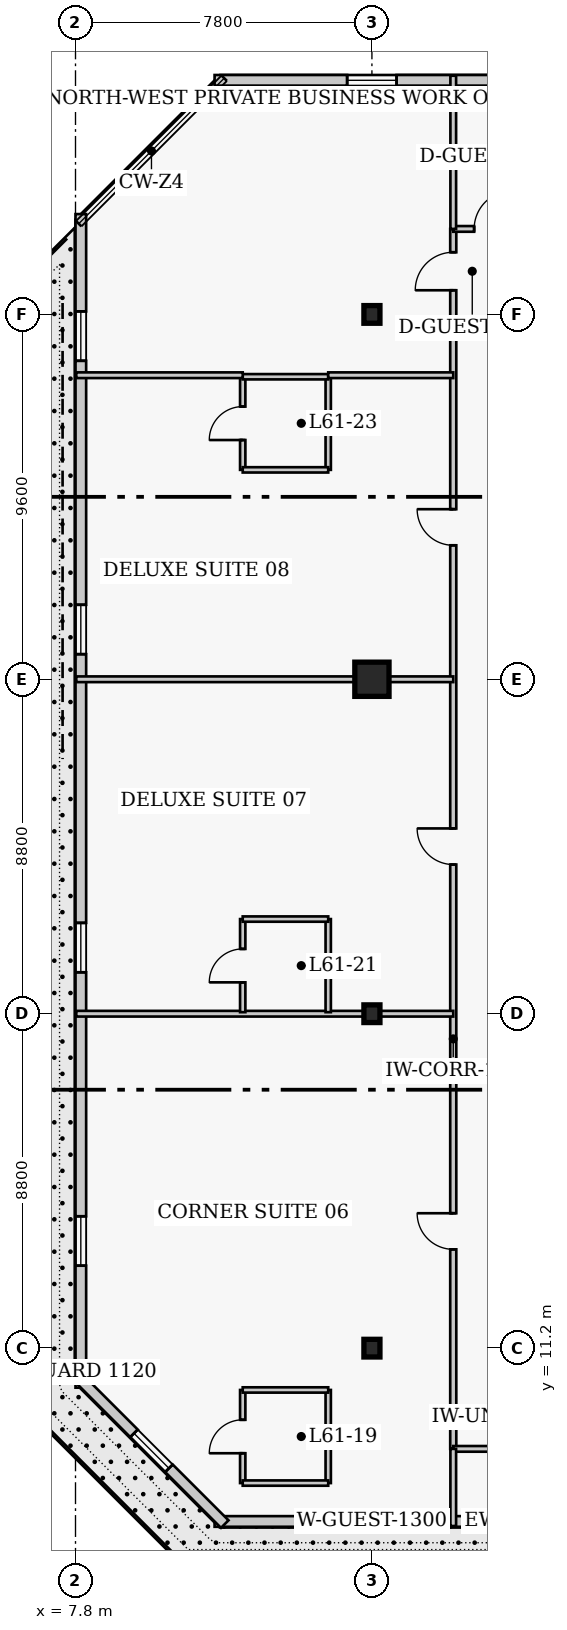
"""IFC4 building model, lengths in metres.
Left out: names, types, materials, properties, quantities, classifications, styles, units other than length and angle.
Written with IfcOpenShell. Run it as: python <this file> out.ifc"""

import sys

from ifc_helpers import new_model, si_unit, direction, frame, frame_2d, origin, origin_2d, place, context, subcontext, project, spatial, rectangle, i_section, extrude, element, fill, save


model = new_model("IFC4")
c1 = context("Model", 3, precision=1e-05, world=origin(), true_north=direction((0.0, 1.0)))
c2 = subcontext(c1, "Body", "Model", "MODEL_VIEW")
j1 = project(units=[si_unit("LENGTHUNIT", "METRE"), si_unit("PLANEANGLEUNIT", "RADIAN")], contexts=[c1])
p1 = place(None, origin())
s1 = spatial("IfcSite", under=j1, at=p1, CompositionType="ELEMENT")
p2 = place(p1, origin())
s2 = spatial("IfcBuilding", under=s1, at=p2, CompositionType="ELEMENT")
p3 = place(p2, frame((0.0, 0.0, 245.4)))
s3 = spatial("IfcBuildingStorey", under=s2, at=p3, CompositionType="ELEMENT", Elevation=245.4)
for number, where, z_axis, x_axis in (
    (1, (15.6, 11.2, 0.0), (0.0, 0.0, 1.0), (1.0, 0.0, 0.0)),
    (2, (15.6, 20.0, 0.0), (0.0, 0.0, 1.0), (1.0, 0.0, 0.0)),
):
    element("IfcColumn", number, at=place(p3, frame(where, z_axis=z_axis, x_axis=x_axis)), inside=s3, PredefinedType="COLUMN", context=c2, shape_type="SweptSolid", body=[
        extrude(i_section(OverallWidth=0.422, OverallDepth=0.465, WebThickness=0.045, FlangeThickness=0.073, FilletRadius=0.017, at=origin_2d()), origin(), (0.0, 0.0, 1.0), 4.0),
    ])
p4 = place(p3, frame((15.6, 28.8, 0.0), z_axis=(0.0, 0.0, 1.0), x_axis=(1.0, 0.0, 0.0)))
e3 = element("IfcColumn", 3, at=p4, inside=s3, PredefinedType="COLUMN", context=c2, shape_type="SweptSolid", body=[
    extrude(rectangle(XDim=0.9, YDim=0.9, at=origin_2d()), origin(), (0.0, 0.0, 1.0), 4.0),
])
p5 = place(p3, frame((15.6, 38.4, 0.0), z_axis=(0.0, 0.0, 1.0), x_axis=(1.0, 0.0, 0.0)))
e4 = element("IfcColumn", 4, at=p5, inside=s3, PredefinedType="COLUMN", context=c2, shape_type="SweptSolid", body=[
    extrude(i_section(OverallWidth=0.422, OverallDepth=0.465, WebThickness=0.045, FlangeThickness=0.073, FilletRadius=0.017, at=origin_2d()), origin(), (0.0, 0.0, 1.0), 4.0),
])
p6 = place(p3, frame((11.46, 6.64, 0.0), z_axis=(0.0, 0.0, 1.0), x_axis=(1.0, 0.0, 0.0)))
e5 = element("IfcWall", 5, at=p6, inside=s3, PredefinedType="SOLIDWALL", context=c2, shape_type="SweptSolid", body=[
    extrude(rectangle(XDim=24.83, YDim=0.28, at=frame_2d((12.415, 0.0))), origin(), (0.0, 0.0, 1.0), 3.76),
])
p7 = place(p6, frame((14.715, 0.0, 0.0)))
e6 = element("IfcOpeningElement", 6, at=p7, cuts=e5, PredefinedType="OPENING", context=c2, shape_type="SweptSolid", body=[
    extrude(rectangle(XDim=1.4, YDim=2.15, at=frame_2d((0.7, 1.075))), frame((0.0, 0.15, 0.0), z_axis=(0.0, -1.0, 0.0), x_axis=(1.0, 0.0, 0.0)), (0.0, 0.0, 1.0), 0.3),
])
p8 = place(p6, frame((3.488, 0.0, 0.85)))
e7 = element("IfcOpeningElement", 7, at=p8, cuts=e5, PredefinedType="OPENING", context=c2, shape_type="SweptSolid", body=[
    extrude(rectangle(XDim=1.3, YDim=1.7, at=frame_2d((0.65, 0.85))), frame((0.0, 0.15, 0.0), z_axis=(0.0, -1.0, 0.0), x_axis=(1.0, 0.0, 0.0)), (0.0, 0.0, 1.0), 0.3),
])
p9 = place(p6, frame((20.692, 0.0, 0.85)))
e8 = element("IfcOpeningElement", 8, at=p9, cuts=e5, PredefinedType="OPENING", context=c2, shape_type="SweptSolid", body=[
    extrude(rectangle(XDim=1.3, YDim=1.7, at=frame_2d((0.65, 0.85))), frame((0.0, 0.15, 0.0), z_axis=(0.0, -1.0, 0.0), x_axis=(1.0, 0.0, 0.0)), (0.0, 0.0, 1.0), 0.3),
])
p10 = place(p6, frame((9.82, 0.0, 0.85)))
e9 = element("IfcOpeningElement", 9, at=p10, cuts=e5, PredefinedType="OPENING", context=c2, shape_type="SweptSolid", body=[
    extrude(rectangle(XDim=1.3, YDim=1.7, at=frame_2d((0.65, 0.85))), frame((0.0, 0.15, 0.0), z_axis=(0.0, -1.0, 0.0), x_axis=(1.0, 0.0, 0.0)), (0.0, 0.0, 1.0), 0.3),
])
p11 = place(p3, frame((36.29, 44.56, 0.0), z_axis=(0.0, 0.0, 1.0), x_axis=(-1.0, 0.0, 0.0)))
e10 = element("IfcWall", 10, at=p11, inside=s3, PredefinedType="SOLIDWALL", context=c2, shape_type="SweptSolid", body=[
    extrude(rectangle(XDim=24.83, YDim=0.28, at=frame_2d((12.415, 0.0))), origin(), (0.0, 0.0, 1.0), 3.76),
])
p12 = place(p11, frame((3.488, 0.0, 0.85)))
e11 = element("IfcOpeningElement", 11, at=p12, cuts=e10, PredefinedType="OPENING", context=c2, shape_type="SweptSolid", body=[
    extrude(rectangle(XDim=1.3, YDim=1.7, at=frame_2d((0.65, 0.85))), frame((0.0, 0.15, 0.0), z_axis=(0.0, -1.0, 0.0), x_axis=(1.0, 0.0, 0.0)), (0.0, 0.0, 1.0), 0.3),
])
p13 = place(p11, frame((11.765, 0.0, 0.85)))
e12 = element("IfcOpeningElement", 12, at=p13, cuts=e10, PredefinedType="OPENING", context=c2, shape_type="SweptSolid", body=[
    extrude(rectangle(XDim=1.3, YDim=1.7, at=frame_2d((0.65, 0.85))), frame((0.0, 0.15, 0.0), z_axis=(0.0, -1.0, 0.0), x_axis=(1.0, 0.0, 0.0)), (0.0, 0.0, 1.0), 0.3),
])
p14 = place(p11, frame((20.042, 0.0, 0.85)))
e13 = element("IfcOpeningElement", 13, at=p14, cuts=e10, PredefinedType="OPENING", context=c2, shape_type="SweptSolid", body=[
    extrude(rectangle(XDim=1.3, YDim=1.7, at=frame_2d((0.65, 0.85))), frame((0.0, 0.15, 0.0), z_axis=(0.0, -1.0, 0.0), x_axis=(1.0, 0.0, 0.0)), (0.0, 0.0, 1.0), 0.3),
])
p15 = place(p3, frame((7.94, 41.04, 0.0), z_axis=(0.0, 0.0, 1.0), x_axis=(0.0, -1.0, 0.0)))
e14 = element("IfcWall", 14, at=p15, inside=s3, PredefinedType="SOLIDWALL", context=c2, shape_type="SweptSolid", body=[
    extrude(rectangle(XDim=30.88, YDim=0.28, at=frame_2d((15.44, 0.0))), origin(), (0.0, 0.0, 1.0), 3.76),
])
p16 = place(p15, frame((2.56, 0.0, 0.85)))
e15 = element("IfcOpeningElement", 15, at=p16, cuts=e14, PredefinedType="OPENING", context=c2, shape_type="SweptSolid", body=[
    extrude(rectangle(XDim=1.3, YDim=1.7, at=frame_2d((0.65, 0.85))), frame((0.0, 0.15, 0.0), z_axis=(0.0, -1.0, 0.0), x_axis=(1.0, 0.0, 0.0)), (0.0, 0.0, 1.0), 0.3),
])
p17 = place(p15, frame((10.28, 0.0, 0.85)))
e16 = element("IfcOpeningElement", 16, at=p17, cuts=e14, PredefinedType="OPENING", context=c2, shape_type="SweptSolid", body=[
    extrude(rectangle(XDim=1.3, YDim=1.7, at=frame_2d((0.65, 0.85))), frame((0.0, 0.15, 0.0), z_axis=(0.0, -1.0, 0.0), x_axis=(1.0, 0.0, 0.0)), (0.0, 0.0, 1.0), 0.3),
])
p18 = place(p15, frame((18.65, 0.0, 0.85)))
e17 = element("IfcOpeningElement", 17, at=p18, cuts=e14, PredefinedType="OPENING", context=c2, shape_type="SweptSolid", body=[
    extrude(rectangle(XDim=1.3, YDim=1.7, at=frame_2d((0.65, 0.85))), frame((0.0, 0.15, 0.0), z_axis=(0.0, -1.0, 0.0), x_axis=(1.0, 0.0, 0.0)), (0.0, 0.0, 1.0), 0.3),
])
p19 = place(p15, frame((26.37, 0.0, 0.85)))
e18 = element("IfcOpeningElement", 18, at=p19, cuts=e14, PredefinedType="OPENING", context=c2, shape_type="SweptSolid", body=[
    extrude(rectangle(XDim=1.3, YDim=1.7, at=frame_2d((0.65, 0.85))), frame((0.0, 0.15, 0.0), z_axis=(0.0, -1.0, 0.0), x_axis=(1.0, 0.0, 0.0)), (0.0, 0.0, 1.0), 0.3),
])
p20 = place(p3, frame((7.871, 10.427, 0.0), z_axis=(0.0, 0.0, 1.0), x_axis=(0.707129162587, -0.707084399077, 0.0)))
e19 = element("IfcWall", 19, at=p20, inside=s3, PredefinedType="SOLIDWALL", context=c2, shape_type="SweptSolid", body=[
    extrude(rectangle(XDim=5.454, YDim=0.28, at=frame_2d((2.727, 0.0))), origin(), (0.0, 0.0, 1.0), 3.76),
])
p21 = place(p20, frame((2.077, 0.0, 0.85)))
e20 = element("IfcOpeningElement", 20, at=p21, cuts=e19, PredefinedType="OPENING", context=c2, shape_type="SweptSolid", body=[
    extrude(rectangle(XDim=1.3, YDim=1.7, at=frame_2d((0.65, 0.85))), frame((0.0, 0.15, 0.0), z_axis=(0.0, -1.0, 0.0), x_axis=(1.0, 0.0, 0.0)), (0.0, 0.0, 1.0), 0.3),
])
p22 = place(p3, frame((17.74, 8.55, 0.0), z_axis=(0.0, 0.0, 1.0), x_axis=(0.0, 1.0, 0.0)))
e21 = element("IfcWall", 21, at=p22, inside=s3, PredefinedType="PARTITIONING", context=c2, shape_type="SweptSolid", body=[
    extrude(rectangle(XDim=32.1, YDim=0.16, at=frame_2d((16.05, 0.0))), origin(), (0.0, 0.0, 1.0), 3.76),
])
p23 = place(p22, frame((5.25, 0.0, 0.0)))
e22 = element("IfcOpeningElement", 22, at=p23, cuts=e21, PredefinedType="OPENING", context=c2, shape_type="SweptSolid", body=[
    extrude(rectangle(XDim=0.95, YDim=2.1, at=frame_2d((0.475, 1.05))), frame((0.0, 0.09, 0.0), z_axis=(0.0, -1.0, 0.0), x_axis=(1.0, 0.0, 0.0)), (0.0, 0.0, 1.0), 0.18),
])
p24 = place(p22, frame((15.375, 0.0, 0.0)))
e23 = element("IfcOpeningElement", 23, at=p24, cuts=e21, PredefinedType="OPENING", context=c2, shape_type="SweptSolid", body=[
    extrude(rectangle(XDim=0.95, YDim=2.1, at=frame_2d((0.475, 1.05))), frame((0.0, 0.09, 0.0), z_axis=(0.0, -1.0, 0.0), x_axis=(1.0, 0.0, 0.0)), (0.0, 0.0, 1.0), 0.18),
])
p25 = place(p22, frame((23.775, 0.0, 0.0)))
e24 = element("IfcOpeningElement", 24, at=p25, cuts=e21, PredefinedType="OPENING", context=c2, shape_type="SweptSolid", body=[
    extrude(rectangle(XDim=0.95, YDim=2.1, at=frame_2d((0.475, 1.05))), frame((0.0, 0.09, 0.0), z_axis=(0.0, -1.0, 0.0), x_axis=(1.0, 0.0, 0.0)), (0.0, 0.0, 1.0), 0.18),
])
p26 = place(p22, frame((30.486, 0.0, 0.0)))
e25 = element("IfcOpeningElement", 25, at=p26, cuts=e21, PredefinedType="OPENING", context=c2, shape_type="SweptSolid", body=[
    extrude(rectangle(XDim=1.0, YDim=2.15, at=frame_2d((0.5, 1.075))), frame((0.0, 0.09, 0.0), z_axis=(0.0, -1.0, 0.0), x_axis=(1.0, 0.0, 0.0)), (0.0, 0.0, 1.0), 0.18),
])
p27 = place(p3, frame((17.74, 8.55, 0.0), z_axis=(0.0, 0.0, 1.0), x_axis=(1.0, 0.0, 0.0)))
e26 = element("IfcWall", 26, at=p27, inside=s3, PredefinedType="PARTITIONING", context=c2, shape_type="SweptSolid", body=[
    extrude(rectangle(XDim=2.22, YDim=0.15, at=frame_2d((1.11, 0.0))), origin(), (0.0, 0.0, 1.0), 3.76),
])
p28 = place(p3, frame((17.74, 40.65, 0.0), z_axis=(0.0, 0.0, 1.0), x_axis=(1.0, 0.0, 0.0)))
e27 = element("IfcWall", 27, at=p28, inside=s3, PredefinedType="PARTITIONING", context=c2, shape_type="SweptSolid", body=[
    extrude(rectangle(XDim=4.36, YDim=0.15, at=frame_2d((2.18, 0.0))), origin(), (0.0, 0.0, 1.0), 3.76),
])
p29 = place(p28, frame((0.55, 0.0, 0.0)))
e28 = element("IfcOpeningElement", 28, at=p29, cuts=e27, PredefinedType="OPENING", context=c2, shape_type="SweptSolid", body=[
    extrude(rectangle(XDim=1.0, YDim=2.15, at=frame_2d((0.5, 1.075))), frame((0.0, 0.085, 0.0), z_axis=(0.0, -1.0, 0.0), x_axis=(1.0, 0.0, 0.0)), (0.0, 0.0, 1.0), 0.17),
])
p30 = place(p3, frame((17.74, 40.65, 0.0), z_axis=(0.0, 0.0, 1.0), x_axis=(0.0, 1.0, 0.0)))
e29 = element("IfcWall", 29, at=p30, inside=s3, PredefinedType="PARTITIONING", context=c2, shape_type="SweptSolid", body=[
    extrude(rectangle(XDim=4.03, YDim=0.15, at=frame_2d((2.015, 0.0))), origin(), (0.0, 0.0, 1.0), 3.76),
])
p31 = place(p3, frame((17.74, 6.52, 0.0), z_axis=(0.0, 0.0, 1.0), x_axis=(0.0, 1.0, 0.0)))
e30 = element("IfcWall", 30, at=p31, inside=s3, PredefinedType="PARTITIONING", context=c2, shape_type="SweptSolid", body=[
    extrude(rectangle(XDim=2.03, YDim=0.15, at=frame_2d((1.015, 0.0))), origin(), (0.0, 0.0, 1.0), 3.76),
])
p32 = place(p3, frame((12.2, 7.65, 0.0), z_axis=(0.0, 0.0, 1.0), x_axis=(0.0, 1.0, 0.0)))
e31 = element("IfcWall", 31, at=p32, inside=s3, PredefinedType="PLUMBINGWALL", context=c2, shape_type="SweptSolid", body=[
    extrude(rectangle(XDim=2.45, YDim=0.14, at=frame_2d((1.225, 0.0))), origin(), (0.0, 0.0, 1.0), 3.76),
])
p33 = place(p32, frame((0.785, 0.0, 0.0)))
e32 = element("IfcOpeningElement", 32, at=p33, cuts=e31, PredefinedType="OPENING", context=c2, shape_type="SweptSolid", body=[
    extrude(rectangle(XDim=0.88, YDim=2.05, at=frame_2d((0.44, 1.025))), frame((0.0, 0.08, 0.0), z_axis=(0.0, -1.0, 0.0), x_axis=(1.0, 0.0, 0.0)), (0.0, 0.0, 1.0), 0.16),
])
p34 = place(p3, frame((14.45, 7.65, 0.0), z_axis=(0.0, 0.0, 1.0), x_axis=(0.0, 1.0, 0.0)))
e33 = element("IfcWall", 33, at=p34, inside=s3, PredefinedType="PLUMBINGWALL", context=c2, shape_type="SweptSolid", body=[
    extrude(rectangle(XDim=2.45, YDim=0.14, at=frame_2d((1.225, 0.0))), origin(), (0.0, 0.0, 1.0), 3.76),
])
for number, where, z_axis, x_axis in (
    (34, (12.2, 7.65, 0.0), (0.0, 0.0, 1.0), (1.0, 0.0, 0.0)),
    (35, (12.2, 10.1, 0.0), (0.0, 0.0, 1.0), (1.0, 0.0, 0.0)),
):
    element("IfcWall", number, at=place(p3, frame(where, z_axis=z_axis, x_axis=x_axis)), inside=s3, PredefinedType="PLUMBINGWALL", context=c2, shape_type="SweptSolid", body=[
        extrude(rectangle(XDim=2.25, YDim=0.14, at=frame_2d((1.125, 0.0))), origin(), (0.0, 0.0, 1.0), 3.76),
    ])
p35 = place(p3, frame((7.82, 20.0, 0.0), z_axis=(0.0, 0.0, 1.0), x_axis=(1.0, 0.0, 0.0)))
e36 = element("IfcWall", 36, at=p35, inside=s3, PredefinedType="PARTITIONING", context=c2, shape_type="SweptSolid", body=[
    extrude(rectangle(XDim=9.92, YDim=0.15, at=frame_2d((4.96, 0.0))), origin(), (0.0, 0.0, 1.0), 3.064),
])
p36 = place(p3, frame((12.2, 20.04, 0.0), z_axis=(0.0, 0.0, 1.0), x_axis=(0.0, 1.0, 0.0)))
e37 = element("IfcWall", 37, at=p36, inside=s3, PredefinedType="PLUMBINGWALL", context=c2, shape_type="SweptSolid", body=[
    extrude(rectangle(XDim=2.45, YDim=0.14, at=frame_2d((1.225, 0.0))), origin(), (0.0, 0.0, 1.0), 3.76),
])
p37 = place(p36, frame((0.785, 0.0, 0.0)))
e38 = element("IfcOpeningElement", 38, at=p37, cuts=e37, PredefinedType="OPENING", context=c2, shape_type="SweptSolid", body=[
    extrude(rectangle(XDim=0.88, YDim=2.05, at=frame_2d((0.44, 1.025))), frame((0.0, 0.08, 0.0), z_axis=(0.0, -1.0, 0.0), x_axis=(1.0, 0.0, 0.0)), (0.0, 0.0, 1.0), 0.16),
])
p38 = place(p3, frame((14.45, 20.04, 0.0), z_axis=(0.0, 0.0, 1.0), x_axis=(0.0, 1.0, 0.0)))
e39 = element("IfcWall", 39, at=p38, inside=s3, PredefinedType="PLUMBINGWALL", context=c2, shape_type="SweptSolid", body=[
    extrude(rectangle(XDim=2.45, YDim=0.14, at=frame_2d((1.225, 0.0))), origin(), (0.0, 0.0, 1.0), 3.76),
])
p39 = place(p3, frame((12.2, 22.49, 0.0), z_axis=(0.0, 0.0, 1.0), x_axis=(1.0, 0.0, 0.0)))
e40 = element("IfcWall", 40, at=p39, inside=s3, PredefinedType="PLUMBINGWALL", context=c2, shape_type="SweptSolid", body=[
    extrude(rectangle(XDim=2.25, YDim=0.14, at=frame_2d((1.125, 0.0))), origin(), (0.0, 0.0, 1.0), 3.76),
])
p40 = place(p3, frame((7.82, 28.8, 0.0), z_axis=(0.0, 0.0, 1.0), x_axis=(1.0, 0.0, 0.0)))
e41 = element("IfcWall", 41, at=p40, inside=s3, PredefinedType="PARTITIONING", context=c2, shape_type="SweptSolid", body=[
    extrude(rectangle(XDim=9.92, YDim=0.15, at=frame_2d((4.96, 0.0))), origin(), (0.0, 0.0, 1.0), 3.064),
])
p41 = place(p3, frame((12.2, 34.31, 0.0), z_axis=(0.0, 0.0, 1.0), x_axis=(0.0, 1.0, 0.0)))
e42 = element("IfcWall", 42, at=p41, inside=s3, PredefinedType="PLUMBINGWALL", context=c2, shape_type="SweptSolid", body=[
    extrude(rectangle(XDim=2.45, YDim=0.14, at=frame_2d((1.225, 0.0))), origin(), (0.0, 0.0, 1.0), 3.76),
])
p42 = place(p41, frame((0.785, 0.0, 0.0)))
e43 = element("IfcOpeningElement", 43, at=p42, cuts=e42, PredefinedType="OPENING", context=c2, shape_type="SweptSolid", body=[
    extrude(rectangle(XDim=0.88, YDim=2.05, at=frame_2d((0.44, 1.025))), frame((0.0, 0.08, 0.0), z_axis=(0.0, -1.0, 0.0), x_axis=(1.0, 0.0, 0.0)), (0.0, 0.0, 1.0), 0.16),
])
p43 = place(p3, frame((14.45, 34.31, 0.0), z_axis=(0.0, 0.0, 1.0), x_axis=(0.0, 1.0, 0.0)))
e44 = element("IfcWall", 44, at=p43, inside=s3, PredefinedType="PLUMBINGWALL", context=c2, shape_type="SweptSolid", body=[
    extrude(rectangle(XDim=2.45, YDim=0.14, at=frame_2d((1.225, 0.0))), origin(), (0.0, 0.0, 1.0), 3.76),
])
for number, where, z_axis, x_axis in (
    (45, (12.2, 34.31, 0.0), (0.0, 0.0, 1.0), (1.0, 0.0, 0.0)),
    (46, (12.2, 36.76, 0.0), (0.0, 0.0, 1.0), (1.0, 0.0, 0.0)),
):
    element("IfcWall", number, at=place(p3, frame(where, z_axis=z_axis, x_axis=x_axis)), inside=s3, PredefinedType="PLUMBINGWALL", context=c2, shape_type="SweptSolid", body=[
        extrude(rectangle(XDim=2.25, YDim=0.14, at=frame_2d((1.125, 0.0))), origin(), (0.0, 0.0, 1.0), 3.76),
    ])
p44 = place(p3, frame((7.82, 36.8, 0.0), z_axis=(0.0, 0.0, 1.0), x_axis=(1.0, 0.0, 0.0)))
e47 = element("IfcWall", 47, at=p44, inside=s3, PredefinedType="PARTITIONING", context=c2, shape_type="SweptSolid", body=[
    extrude(rectangle(XDim=4.38, YDim=0.15, at=frame_2d((2.19, 0.0))), origin(), (0.0, 0.0, 1.0), 3.76),
])
p45 = place(p3, frame((14.45, 36.8, 0.0), z_axis=(0.0, 0.0, 1.0), x_axis=(1.0, 0.0, 0.0)))
e48 = element("IfcWall", 48, at=p45, inside=s3, PredefinedType="PARTITIONING", context=c2, shape_type="SweptSolid", body=[
    extrude(rectangle(XDim=3.29, YDim=0.15, at=frame_2d((1.645, 0.0))), origin(), (0.0, 0.0, 1.0), 3.76),
])
p46 = place(p8, origin())
e49 = element("IfcWindow", 49, at=p46, inside=s3, PartitioningType="SINGLE_PANEL", PredefinedType="WINDOW", context=c2, shape_type="SweptSolid", body=[
    extrude(rectangle(XDim=1.3, YDim=1.7, at=frame_2d((0.65, 0.85))), frame((0.0, 0.03, 0.0), z_axis=(0.0, -1.0, 0.0), x_axis=(1.0, 0.0, 0.0)), (0.0, 0.0, 1.0), 0.06),
])
fill(e7, e49)
p47 = place(p14, origin())
e50 = element("IfcWindow", 50, at=p47, inside=s3, PartitioningType="SINGLE_PANEL", PredefinedType="WINDOW", context=c2, shape_type="SweptSolid", body=[
    extrude(rectangle(XDim=1.3, YDim=1.7, at=frame_2d((0.65, 0.85))), frame((0.0, 0.03, 0.0), z_axis=(0.0, -1.0, 0.0), x_axis=(1.0, 0.0, 0.0)), (0.0, 0.0, 1.0), 0.06),
])
fill(e13, e50)
p48 = place(p16, origin())
e51 = element("IfcWindow", 51, at=p48, inside=s3, PartitioningType="SINGLE_PANEL", PredefinedType="WINDOW", context=c2, shape_type="SweptSolid", body=[
    extrude(rectangle(XDim=1.3, YDim=1.7, at=frame_2d((0.65, 0.85))), frame((0.0, 0.03, 0.0), z_axis=(0.0, -1.0, 0.0), x_axis=(1.0, 0.0, 0.0)), (0.0, 0.0, 1.0), 0.06),
])
fill(e15, e51)
p49 = place(p17, origin())
e52 = element("IfcWindow", 52, at=p49, inside=s3, PartitioningType="SINGLE_PANEL", PredefinedType="WINDOW", context=c2, shape_type="SweptSolid", body=[
    extrude(rectangle(XDim=1.3, YDim=1.7, at=frame_2d((0.65, 0.85))), frame((0.0, 0.03, 0.0), z_axis=(0.0, -1.0, 0.0), x_axis=(1.0, 0.0, 0.0)), (0.0, 0.0, 1.0), 0.06),
])
fill(e16, e52)
p50 = place(p18, origin())
e53 = element("IfcWindow", 53, at=p50, inside=s3, PartitioningType="SINGLE_PANEL", PredefinedType="WINDOW", context=c2, shape_type="SweptSolid", body=[
    extrude(rectangle(XDim=1.3, YDim=1.7, at=frame_2d((0.65, 0.85))), frame((0.0, 0.03, 0.0), z_axis=(0.0, -1.0, 0.0), x_axis=(1.0, 0.0, 0.0)), (0.0, 0.0, 1.0), 0.06),
])
fill(e17, e53)
p51 = place(p19, origin())
e54 = element("IfcWindow", 54, at=p51, inside=s3, PartitioningType="SINGLE_PANEL", PredefinedType="WINDOW", context=c2, shape_type="SweptSolid", body=[
    extrude(rectangle(XDim=1.3, YDim=1.7, at=frame_2d((0.65, 0.85))), frame((0.0, 0.03, 0.0), z_axis=(0.0, -1.0, 0.0), x_axis=(1.0, 0.0, 0.0)), (0.0, 0.0, 1.0), 0.06),
])
fill(e18, e54)
p52 = place(p21, origin())
e55 = element("IfcWindow", 55, at=p52, inside=s3, PartitioningType="SINGLE_PANEL", PredefinedType="WINDOW", context=c2, shape_type="SweptSolid", body=[
    extrude(rectangle(XDim=1.3, YDim=1.7, at=frame_2d((0.65, 0.85))), frame((0.0, 0.03, 0.0), z_axis=(0.0, -1.0, 0.0), x_axis=(1.0, 0.0, 0.0)), (0.0, 0.0, 1.0), 0.06),
])
fill(e20, e55)
p53 = place(p29, origin())
e56 = element("IfcDoor", 56, at=p53, inside=s3, OperationType="SINGLE_SWING_RIGHT", PredefinedType="DOOR", context=c2, shape_type="SweptSolid", body=[
    extrude(rectangle(XDim=1.0, YDim=2.15, at=frame_2d((0.5, 1.075))), frame((0.0, 0.025, 0.0), z_axis=(0.0, -1.0, 0.0), x_axis=(1.0, 0.0, 0.0)), (0.0, 0.0, 1.0), 0.05),
])
fill(e28, e56)
p54 = place(p33, origin())
e57 = element("IfcDoor", 57, at=p54, inside=s3, OperationType="SINGLE_SWING_LEFT", PredefinedType="DOOR", context=c2, shape_type="SweptSolid", body=[
    extrude(rectangle(XDim=0.88, YDim=2.05, at=frame_2d((0.44, 1.025))), frame((0.0, 0.025, 0.0), z_axis=(0.0, -1.0, 0.0), x_axis=(1.0, 0.0, 0.0)), (0.0, 0.0, 1.0), 0.05),
])
fill(e32, e57)
p55 = place(p23, origin())
e58 = element("IfcDoor", 58, at=p55, inside=s3, OperationType="SINGLE_SWING_RIGHT", PredefinedType="DOOR", context=c2, shape_type="SweptSolid", body=[
    extrude(rectangle(XDim=0.95, YDim=2.1, at=frame_2d((0.475, 1.05))), frame((0.0, 0.025, 0.0), z_axis=(0.0, -1.0, 0.0), x_axis=(1.0, 0.0, 0.0)), (0.0, 0.0, 1.0), 0.05),
])
fill(e22, e58)
p56 = place(p37, origin())
e59 = element("IfcDoor", 59, at=p56, inside=s3, OperationType="SINGLE_SWING_LEFT", PredefinedType="DOOR", context=c2, shape_type="SweptSolid", body=[
    extrude(rectangle(XDim=0.88, YDim=2.05, at=frame_2d((0.44, 1.025))), frame((0.0, 0.025, 0.0), z_axis=(0.0, -1.0, 0.0), x_axis=(1.0, 0.0, 0.0)), (0.0, 0.0, 1.0), 0.05),
])
fill(e38, e59)
p57 = place(p24, origin())
e60 = element("IfcDoor", 60, at=p57, inside=s3, OperationType="SINGLE_SWING_RIGHT", PredefinedType="DOOR", context=c2, shape_type="SweptSolid", body=[
    extrude(rectangle(XDim=0.95, YDim=2.1, at=frame_2d((0.475, 1.05))), frame((0.0, 0.025, 0.0), z_axis=(0.0, -1.0, 0.0), x_axis=(1.0, 0.0, 0.0)), (0.0, 0.0, 1.0), 0.05),
])
fill(e23, e60)
p58 = place(p42, origin())
e61 = element("IfcDoor", 61, at=p58, inside=s3, OperationType="SINGLE_SWING_LEFT", PredefinedType="DOOR", context=c2, shape_type="SweptSolid", body=[
    extrude(rectangle(XDim=0.88, YDim=2.05, at=frame_2d((0.44, 1.025))), frame((0.0, 0.025, 0.0), z_axis=(0.0, -1.0, 0.0), x_axis=(1.0, 0.0, 0.0)), (0.0, 0.0, 1.0), 0.05),
])
fill(e43, e61)
p59 = place(p25, origin())
e62 = element("IfcDoor", 62, at=p59, inside=s3, OperationType="SINGLE_SWING_RIGHT", PredefinedType="DOOR", context=c2, shape_type="SweptSolid", body=[
    extrude(rectangle(XDim=0.95, YDim=2.1, at=frame_2d((0.475, 1.05))), frame((0.0, 0.025, 0.0), z_axis=(0.0, -1.0, 0.0), x_axis=(1.0, 0.0, 0.0)), (0.0, 0.0, 1.0), 0.05),
])
fill(e24, e62)
p60 = place(p26, origin())
e63 = element("IfcDoor", 63, at=p60, inside=s3, OperationType="SINGLE_SWING_LEFT", PredefinedType="DOOR", context=c2, shape_type="SweptSolid", body=[
    extrude(rectangle(XDim=1.0, YDim=2.15, at=frame_2d((0.5, 1.075))), frame((0.0, 0.025, 0.0), z_axis=(0.0, -1.0, 0.0), x_axis=(1.0, 0.0, 0.0)), (0.0, 0.0, 1.0), 0.05),
])
fill(e25, e63)
save(model, sys.argv[1])
